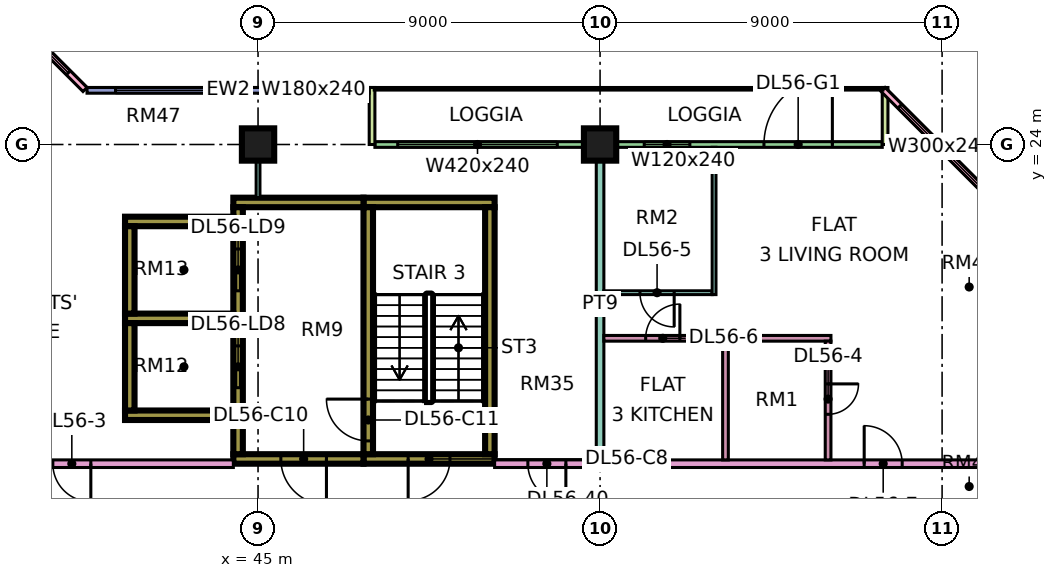
"""IFC4 building model, lengths in metres.
Left out: names, types, materials, properties, quantities, classifications, styles, units other than length and angle.
Written with IfcOpenShell. Run it as: python <this file> out.ifc"""

import sys

from ifc_helpers import new_model, si_unit, direction, frame, frame_2d, origin, origin_2d, place, context, subcontext, project, spatial, rectangle, extrude, element, fill, save


model = new_model("IFC4")
c1 = context("Model", 3, precision=1e-05, world=origin(), true_north=direction((0.0, 1.0)))
c2 = subcontext(c1, "Body", "Model", "MODEL_VIEW")
j1 = project(units=[si_unit("LENGTHUNIT", "METRE"), si_unit("PLANEANGLEUNIT", "RADIAN")], contexts=[c1])
p1 = place(None, origin())
s1 = spatial("IfcSite", under=j1, at=p1, CompositionType="ELEMENT")
p2 = place(p1, origin())
s2 = spatial("IfcBuilding", under=s1, at=p2, CompositionType="ELEMENT")
p3 = place(p2, frame((0.0, 0.0, 237.9)))
s3 = spatial("IfcBuildingStorey", under=s2, at=p3, CompositionType="ELEMENT", Elevation=237.9)
for number, where, z_axis, x_axis in (
    (1, (45.0, 24.0, 0.0), (0.0, 0.0, 1.0), (1.0, 0.0, 0.0)),
    (2, (54.0, 24.0, 0.0), (0.0, 0.0, 1.0), (1.0, 0.0, 0.0)),
):
    element("IfcColumn", number, at=place(p3, frame(where, z_axis=z_axis, x_axis=x_axis)), inside=s3, PredefinedType="COLUMN", context=c2, shape_type="SweptSolid", body=[
        extrude(rectangle(XDim=0.85, YDim=0.85, at=origin_2d()), origin(), (0.0, 0.0, 1.0), 3.75),
    ])
p4 = place(p3, frame((47.775, 15.725, 0.0), z_axis=(0.0, 0.0, 1.0), x_axis=(1.0, 0.0, 0.0)))
e3 = element("IfcWall", 3, at=p4, inside=s3, PredefinedType="SHEAR", context=c2, shape_type="SweptSolid", body=[
    extrude(rectangle(XDim=3.45, YDim=0.25, at=frame_2d((1.725, 0.0))), origin(), (0.0, 0.0, 1.0), 3.75),
])
p5 = place(p4, frame((1.175, 0.0, 0.0)))
e4 = element("IfcOpeningElement", 4, at=p5, cuts=e3, PredefinedType="OPENING", context=c2, shape_type="SweptSolid", body=[
    extrude(rectangle(XDim=1.1, YDim=2.2, at=frame_2d((0.55, 1.1))), frame((0.0, 0.135, 0.0), z_axis=(0.0, -1.0, 0.0), x_axis=(1.0, 0.0, 0.0)), (0.0, 0.0, 1.0), 0.27),
])
p6 = place(p3, frame((47.775, 22.475, 0.0), z_axis=(0.0, 0.0, 1.0), x_axis=(1.0, 0.0, 0.0)))
e5 = element("IfcWall", 5, at=p6, inside=s3, PredefinedType="SHEAR", context=c2, shape_type="SweptSolid", body=[
    extrude(rectangle(XDim=3.45, YDim=0.25, at=frame_2d((1.725, 0.0))), origin(), (0.0, 0.0, 1.0), 3.75),
])
p7 = place(p3, frame((47.9, 15.85, 0.0), z_axis=(0.0, 0.0, 1.0), x_axis=(0.0, 1.0, 0.0)))
e6 = element("IfcWall", 6, at=p7, inside=s3, PredefinedType="SHEAR", context=c2, shape_type="SweptSolid", body=[
    extrude(rectangle(XDim=6.5, YDim=0.25, at=frame_2d((3.25, 0.0))), origin(), (0.0, 0.0, 1.0), 3.75),
])
p8 = place(p7, frame((0.35, 0.0, 0.0)))
e7 = element("IfcOpeningElement", 7, at=p8, cuts=e6, PredefinedType="OPENING", context=c2, shape_type="SweptSolid", body=[
    extrude(rectangle(XDim=1.1, YDim=2.2, at=frame_2d((0.55, 1.1))), frame((0.0, 0.135, 0.0), z_axis=(0.0, -1.0, 0.0), x_axis=(1.0, 0.0, 0.0)), (0.0, 0.0, 1.0), 0.27),
])
p9 = place(p3, frame((51.1, 15.85, 0.0), z_axis=(0.0, 0.0, 1.0), x_axis=(0.0, 1.0, 0.0)))
e8 = element("IfcWall", 8, at=p9, inside=s3, PredefinedType="SHEAR", context=c2, shape_type="SweptSolid", body=[
    extrude(rectangle(XDim=6.5, YDim=0.25, at=frame_2d((3.25, 0.0))), origin(), (0.0, 0.0, 1.0), 3.75),
])
p10 = place(p3, frame((44.35, 15.725, 0.0), z_axis=(0.0, 0.0, 1.0), x_axis=(1.0, 0.0, 0.0)))
e9 = element("IfcWall", 9, at=p10, inside=s3, PredefinedType="SHEAR", context=c2, shape_type="SweptSolid", body=[
    extrude(rectangle(XDim=3.425, YDim=0.25, at=frame_2d((1.712, 0.0))), origin(), (0.0, 0.0, 1.0), 3.75),
])
p11 = place(p10, frame((1.25, 0.0, 0.0)))
e10 = element("IfcOpeningElement", 10, at=p11, cuts=e9, PredefinedType="OPENING", context=c2, shape_type="SweptSolid", body=[
    extrude(rectangle(XDim=1.2, YDim=2.2, at=frame_2d((0.6, 1.1))), frame((0.0, 0.135, 0.0), z_axis=(0.0, -1.0, 0.0), x_axis=(1.0, 0.0, 0.0)), (0.0, 0.0, 1.0), 0.27),
])
p12 = place(p3, frame((44.35, 22.475, 0.0), z_axis=(0.0, 0.0, 1.0), x_axis=(1.0, 0.0, 0.0)))
e11 = element("IfcWall", 11, at=p12, inside=s3, PredefinedType="SHEAR", context=c2, shape_type="SweptSolid", body=[
    extrude(rectangle(XDim=3.425, YDim=0.25, at=frame_2d((1.712, 0.0))), origin(), (0.0, 0.0, 1.0), 3.75),
])
p13 = place(p3, frame((44.475, 15.85, 0.0), z_axis=(0.0, 0.0, 1.0), x_axis=(0.0, 1.0, 0.0)))
e12 = element("IfcWall", 12, at=p13, inside=s3, PredefinedType="SHEAR", context=c2, shape_type="SweptSolid", body=[
    extrude(rectangle(XDim=6.5, YDim=0.25, at=frame_2d((3.25, 0.0))), origin(), (0.0, 0.0, 1.0), 3.75),
])
p14 = place(p13, frame((1.75, 0.0, 0.0)))
e13 = element("IfcOpeningElement", 13, at=p14, cuts=e12, PredefinedType="OPENING", context=c2, shape_type="SweptSolid", body=[
    extrude(rectangle(XDim=1.1, YDim=2.2, at=frame_2d((0.55, 1.1))), frame((0.0, 0.135, 0.0), z_axis=(0.0, -1.0, 0.0), x_axis=(1.0, 0.0, 0.0)), (0.0, 0.0, 1.0), 0.27),
])
p15 = place(p13, frame((4.3, 0.0, 0.0)))
e14 = element("IfcOpeningElement", 14, at=p15, cuts=e12, PredefinedType="OPENING", context=c2, shape_type="SweptSolid", body=[
    extrude(rectangle(XDim=1.1, YDim=2.2, at=frame_2d((0.55, 1.1))), frame((0.0, 0.135, 0.0), z_axis=(0.0, -1.0, 0.0), x_axis=(1.0, 0.0, 0.0)), (0.0, 0.0, 1.0), 0.27),
])
for number, where, z_axis, x_axis in (
    (15, (41.5, 16.875, 0.0), (0.0, 0.0, 1.0), (1.0, 0.0, 0.0)),
    (16, (41.5, 19.425, 0.0), (0.0, 0.0, 1.0), (1.0, 0.0, 0.0)),
    (17, (41.5, 21.975, 0.0), (0.0, 0.0, 1.0), (1.0, 0.0, 0.0)),
):
    element("IfcWall", number, at=place(p3, frame(where, z_axis=z_axis, x_axis=x_axis)), inside=s3, PredefinedType="SHEAR", context=c2, shape_type="SweptSolid", body=[
        extrude(rectangle(XDim=2.85, YDim=0.25, at=frame_2d((1.425, 0.0))), origin(), (0.0, 0.0, 1.0), 3.75),
    ])
for number, where, z_axis, x_axis in (
    (18, (41.625, 17.0, 0.0), (0.0, 0.0, 1.0), (0.0, 1.0, 0.0)),
    (19, (41.625, 19.55, 0.0), (0.0, 0.0, 1.0), (0.0, 1.0, 0.0)),
):
    element("IfcWall", number, at=place(p3, frame(where, z_axis=z_axis, x_axis=x_axis)), inside=s3, PredefinedType="SHEAR", context=c2, shape_type="SweptSolid", body=[
        extrude(rectangle(XDim=2.3, YDim=0.25, at=frame_2d((1.15, 0.0))), origin(), (0.0, 0.0, 1.0), 3.75),
    ])
p16 = place(p3, frame((61.425, 24.0, 0.0), z_axis=(0.0, 0.0, 1.0), x_axis=(-1.0, 0.0, 0.0)))
e20 = element("IfcWall", 20, at=p16, inside=s3, PredefinedType="SOLIDWALL", context=c2, shape_type="SweptSolid", body=[
    extrude(rectangle(XDim=13.35, YDim=0.15, at=frame_2d((6.675, 0.0))), origin(), (0.0, 0.0, 1.0), 3.35),
])
p17 = place(p16, frame((1.312, 0.0, 0.0)))
e21 = element("IfcOpeningElement", 21, at=p17, cuts=e20, PredefinedType="OPENING", context=c2, shape_type="SweptSolid", body=[
    extrude(rectangle(XDim=1.8, YDim=2.4, at=frame_2d((0.9, 1.2))), frame((0.0, 0.085, 0.0), z_axis=(0.0, -1.0, 0.0), x_axis=(1.0, 0.0, 0.0)), (0.0, 0.0, 1.0), 0.17),
])
p18 = place(p16, frame((5.062, 0.0, 0.45)))
e22 = element("IfcOpeningElement", 22, at=p18, cuts=e20, PredefinedType="OPENING", context=c2, shape_type="SweptSolid", body=[
    extrude(rectangle(XDim=1.2, YDim=2.4, at=frame_2d((0.6, 1.2))), frame((0.0, 0.085, 0.0), z_axis=(0.0, -1.0, 0.0), x_axis=(1.0, 0.0, 0.0)), (0.0, 0.0, 1.0), 0.17),
])
p19 = place(p16, frame((8.55, 0.0, 0.45)))
e23 = element("IfcOpeningElement", 23, at=p19, cuts=e20, PredefinedType="OPENING", context=c2, shape_type="SweptSolid", body=[
    extrude(rectangle(XDim=4.2, YDim=2.4, at=frame_2d((2.1, 1.2))), frame((0.0, 0.085, 0.0), z_axis=(0.0, -1.0, 0.0), x_axis=(1.0, 0.0, 0.0)), (0.0, 0.0, 1.0), 0.17),
])
for number, where, z_axis, x_axis in (
    (24, (61.5, 25.5, 0.0), (0.0, 0.0, 1.0), (0.0, -1.0, 0.0)),
    (25, (48.0, 25.5, 0.0), (0.0, 0.0, 1.0), (0.0, -1.0, 0.0)),
):
    element("IfcWall", number, at=place(p3, frame(where, z_axis=z_axis, x_axis=x_axis)), inside=s3, PredefinedType="SOLIDWALL", context=c2, shape_type="SweptSolid", body=[
        extrude(rectangle(XDim=1.5, YDim=0.15, at=frame_2d((0.75, 0.0))), origin(), (0.0, 0.0, 1.0), 3.35),
    ])
p20 = place(p3, frame((47.925, 25.425, 0.0), z_axis=(0.0, 0.0, 1.0), x_axis=(-1.0, 0.0, 0.0)))
e26 = element("IfcWall", 26, at=p20, inside=s3, PredefinedType="SOLIDWALL", context=c2, shape_type="SweptSolid", body=[
    extrude(rectangle(XDim=7.425, YDim=0.15, at=frame_2d((3.712, 0.0))), origin(), (0.0, 0.0, 1.0), 3.35),
])
p21 = place(p20, frame((0.562, 0.0, 0.45)))
e27 = element("IfcOpeningElement", 27, at=p21, cuts=e26, PredefinedType="OPENING", context=c2, shape_type="SweptSolid", body=[
    extrude(rectangle(XDim=1.8, YDim=2.4, at=frame_2d((0.9, 1.2))), frame((0.0, 0.085, 0.0), z_axis=(0.0, -1.0, 0.0), x_axis=(1.0, 0.0, 0.0)), (0.0, 0.0, 1.0), 0.17),
])
p22 = place(p20, frame((3.675, 0.0, 0.45)))
e28 = element("IfcOpeningElement", 28, at=p22, cuts=e26, PredefinedType="OPENING", context=c2, shape_type="SweptSolid", body=[
    extrude(rectangle(XDim=3.0, YDim=2.4, at=frame_2d((1.5, 1.2))), frame((0.0, 0.085, 0.0), z_axis=(0.0, -1.0, 0.0), x_axis=(1.0, 0.0, 0.0)), (0.0, 0.0, 1.0), 0.17),
])
p23 = place(p3, frame((40.447, 25.447, 0.0), z_axis=(0.0, 0.0, 1.0), x_axis=(-0.707106781187, 0.707106781187, 0.0)))
e29 = element("IfcWall", 29, at=p23, inside=s3, PredefinedType="SOLIDWALL", context=c2, shape_type="SweptSolid", body=[
    extrude(rectangle(XDim=4.243, YDim=0.15, at=frame_2d((2.121, 0.0))), origin(), (0.0, 0.0, 1.0), 3.35),
])
p24 = place(p23, frame((0.621, 0.0, 0.45)))
e30 = element("IfcOpeningElement", 30, at=p24, cuts=e29, PredefinedType="OPENING", context=c2, shape_type="SweptSolid", body=[
    extrude(rectangle(XDim=3.0, YDim=2.4, at=frame_2d((1.5, 1.2))), frame((0.0, 0.085, 0.0), z_axis=(0.0, -1.0, 0.0), x_axis=(1.0, 0.0, 0.0)), (0.0, 0.0, 1.0), 0.17),
])
p25 = place(p3, frame((64.447, 22.447, 0.0), z_axis=(0.0, 0.0, 1.0), x_axis=(-0.707106781187, 0.707106781187, 0.0)))
e31 = element("IfcWall", 31, at=p25, inside=s3, PredefinedType="SOLIDWALL", context=c2, shape_type="SweptSolid", body=[
    extrude(rectangle(XDim=4.243, YDim=0.15, at=frame_2d((2.121, 0.0))), origin(), (0.0, 0.0, 1.0), 3.35),
])
p26 = place(p25, frame((0.621, 0.0, 0.45)))
e32 = element("IfcOpeningElement", 32, at=p26, cuts=e31, PredefinedType="OPENING", context=c2, shape_type="SweptSolid", body=[
    extrude(rectangle(XDim=3.0, YDim=2.4, at=frame_2d((1.5, 1.2))), frame((0.0, 0.085, 0.0), z_axis=(0.0, -1.0, 0.0), x_axis=(1.0, 0.0, 0.0)), (0.0, 0.0, 1.0), 0.17),
])
p27 = place(p3, frame((34.0, 15.6, 0.0), z_axis=(0.0, 0.0, 1.0), x_axis=(1.0, 0.0, 0.0)))
e33 = element("IfcWall", 33, at=p27, inside=s3, PredefinedType="PARTITIONING", context=c2, shape_type="SweptSolid", body=[
    extrude(rectangle(XDim=10.35, YDim=0.2, at=frame_2d((5.175, 0.0))), origin(), (0.0, 0.0, 1.0), 3.35),
])
p28 = place(p27, frame((5.6, 0.0, 0.0)))
e34 = element("IfcOpeningElement", 34, at=p28, cuts=e33, PredefinedType="OPENING", context=c2, shape_type="SweptSolid", body=[
    extrude(rectangle(XDim=1.0, YDim=2.1, at=frame_2d((0.5, 1.05))), frame((0.0, 0.11, 0.0), z_axis=(0.0, -1.0, 0.0), x_axis=(1.0, 0.0, 0.0)), (0.0, 0.0, 1.0), 0.22),
])
p29 = place(p27, frame((0.45, 0.0, 0.0)))
e35 = element("IfcOpeningElement", 35, at=p29, cuts=e33, PredefinedType="OPENING", context=c2, shape_type="SweptSolid", body=[
    extrude(rectangle(XDim=1.2, YDim=2.1, at=frame_2d((0.6, 1.05))), frame((0.0, 0.11, 0.0), z_axis=(0.0, -1.0, 0.0), x_axis=(1.0, 0.0, 0.0)), (0.0, 0.0, 1.0), 0.22),
])
p30 = place(p3, frame((45.0, 22.6, 0.0), z_axis=(0.0, 0.0, 1.0), x_axis=(0.0, 1.0, 0.0)))
e36 = element("IfcWall", 36, at=p30, inside=s3, PredefinedType="PARTITIONING", context=c2, shape_type="SweptSolid", body=[
    extrude(rectangle(XDim=1.4, YDim=0.1, at=frame_2d((0.7, 0.0))), origin(), (0.0, 0.0, 1.0), 3.35),
])
p31 = place(p3, frame((51.225, 15.6, 0.0), z_axis=(0.0, 0.0, 1.0), x_axis=(1.0, 0.0, 0.0)))
e37 = element("IfcWall", 37, at=p31, inside=s3, PredefinedType="PARTITIONING", context=c2, shape_type="SweptSolid", body=[
    extrude(rectangle(XDim=13.125, YDim=0.2, at=frame_2d((6.562, 0.0))), origin(), (0.0, 0.0, 1.0), 3.35),
])
p32 = place(p31, frame((9.725, 0.0, 0.0)))
e38 = element("IfcOpeningElement", 38, at=p32, cuts=e37, PredefinedType="OPENING", context=c2, shape_type="SweptSolid", body=[
    extrude(rectangle(XDim=1.0, YDim=2.1, at=frame_2d((0.5, 1.05))), frame((0.0, 0.11, 0.0), z_axis=(0.0, -1.0, 0.0), x_axis=(1.0, 0.0, 0.0)), (0.0, 0.0, 1.0), 0.22),
])
p33 = place(p31, frame((0.875, 0.0, 0.0)))
e39 = element("IfcOpeningElement", 39, at=p33, cuts=e37, PredefinedType="OPENING", context=c2, shape_type="SweptSolid", body=[
    extrude(rectangle(XDim=1.0, YDim=2.1, at=frame_2d((0.5, 1.05))), frame((0.0, 0.11, 0.0), z_axis=(0.0, -1.0, 0.0), x_axis=(1.0, 0.0, 0.0)), (0.0, 0.0, 1.0), 0.22),
])
p34 = place(p3, frame((54.0, 15.7, 0.0), z_axis=(0.0, 0.0, 1.0), x_axis=(0.0, 1.0, 0.0)))
e40 = element("IfcWall", 40, at=p34, inside=s3, PredefinedType="PARTITIONING", context=c2, shape_type="SweptSolid", body=[
    extrude(rectangle(XDim=8.226, YDim=0.2, at=frame_2d((4.113, 0.0))), origin(), (0.0, 0.0, 1.0), 3.35),
])
p35 = place(p3, frame((54.1, 18.9, 0.0), z_axis=(0.0, 0.0, 1.0), x_axis=(1.0, 0.0, 0.0)))
e41 = element("IfcWall", 41, at=p35, inside=s3, PredefinedType="PARTITIONING", context=c2, shape_type="SweptSolid", body=[
    extrude(rectangle(XDim=5.975, YDim=0.15, at=frame_2d((2.987, 0.0))), origin(), (0.0, 0.0, 1.0), 3.35),
])
p36 = place(p35, frame((1.1, 0.0, 0.0)))
e42 = element("IfcOpeningElement", 42, at=p36, cuts=e41, PredefinedType="OPENING", context=c2, shape_type="SweptSolid", body=[
    extrude(rectangle(XDim=0.9, YDim=2.1, at=frame_2d((0.45, 1.05))), frame((0.0, 0.085, 0.0), z_axis=(0.0, -1.0, 0.0), x_axis=(1.0, 0.0, 0.0)), (0.0, 0.0, 1.0), 0.17),
])
p37 = place(p3, frame((54.1, 20.1, 0.0), z_axis=(0.0, 0.0, 1.0), x_axis=(1.0, 0.0, 0.0)))
e43 = element("IfcWall", 43, at=p37, inside=s3, PredefinedType="PARTITIONING", context=c2, shape_type="SweptSolid", body=[
    extrude(rectangle(XDim=2.85, YDim=0.1, at=frame_2d((1.425, 0.0))), origin(), (0.0, 0.0, 1.0), 3.35),
])
p38 = place(p37, frame((0.95, 0.0, 0.0)))
e44 = element("IfcOpeningElement", 44, at=p38, cuts=e43, PredefinedType="OPENING", context=c2, shape_type="SweptSolid", body=[
    extrude(rectangle(XDim=0.9, YDim=2.1, at=frame_2d((0.45, 1.05))), frame((0.0, 0.06, 0.0), z_axis=(0.0, -1.0, 0.0), x_axis=(1.0, 0.0, 0.0)), (0.0, 0.0, 1.0), 0.12),
])
p39 = place(p3, frame((57.0, 20.05, 0.0), z_axis=(0.0, 0.0, 1.0), x_axis=(0.0, 1.0, 0.0)))
e45 = element("IfcWall", 45, at=p39, inside=s3, PredefinedType="PARTITIONING", context=c2, shape_type="SweptSolid", body=[
    extrude(rectangle(XDim=3.876, YDim=0.1, at=frame_2d((1.938, 0.0))), origin(), (0.0, 0.0, 1.0), 3.35),
])
p40 = place(p3, frame((57.3, 15.7, 0.0), z_axis=(0.0, 0.0, 1.0), x_axis=(0.0, 1.0, 0.0)))
e46 = element("IfcWall", 46, at=p40, inside=s3, PredefinedType="PARTITIONING", context=c2, shape_type="SweptSolid", body=[
    extrude(rectangle(XDim=3.125, YDim=0.15, at=frame_2d((1.562, 0.0))), origin(), (0.0, 0.0, 1.0), 3.35),
])
p41 = place(p3, frame((60.0, 15.7, 0.0), z_axis=(0.0, 0.0, 1.0), x_axis=(0.0, 1.0, 0.0)))
e47 = element("IfcWall", 47, at=p41, inside=s3, PredefinedType="PARTITIONING", context=c2, shape_type="SweptSolid", body=[
    extrude(rectangle(XDim=3.125, YDim=0.15, at=frame_2d((1.562, 0.0))), origin(), (0.0, 0.0, 1.0), 3.35),
])
p42 = place(p41, frame((1.2, 0.0, 0.0)))
e48 = element("IfcOpeningElement", 48, at=p42, cuts=e47, PredefinedType="OPENING", context=c2, shape_type="SweptSolid", body=[
    extrude(rectangle(XDim=0.8, YDim=2.1, at=frame_2d((0.4, 1.05))), frame((0.0, 0.085, 0.0), z_axis=(0.0, -1.0, 0.0), x_axis=(1.0, 0.0, 0.0)), (0.0, 0.0, 1.0), 0.17),
])
p43 = place(p17, frame((1.8, 0.0, 0.0), z_axis=(0.0, 0.0, 1.0), x_axis=(-1.0, 0.0, 0.0)))
e49 = element("IfcDoor", 49, at=p43, inside=s3, OperationType="DOUBLE_DOOR_SINGLE_SWING", PredefinedType="DOOR", context=c2, shape_type="SweptSolid", body=[
    extrude(rectangle(XDim=1.8, YDim=2.4, at=frame_2d((0.9, 1.2))), frame((0.0, 0.025, 0.0), z_axis=(0.0, -1.0, 0.0), x_axis=(1.0, 0.0, 0.0)), (0.0, 0.0, 1.0), 0.05),
])
fill(e21, e49)
p44 = place(p18, origin())
e50 = element("IfcWindow", 50, at=p44, inside=s3, PartitioningType="SINGLE_PANEL", PredefinedType="WINDOW", context=c2, shape_type="SweptSolid", body=[
    extrude(rectangle(XDim=1.2, YDim=2.4, at=frame_2d((0.6, 1.2))), frame((0.0, 0.03, 0.0), z_axis=(0.0, -1.0, 0.0), x_axis=(1.0, 0.0, 0.0)), (0.0, 0.0, 1.0), 0.06),
])
fill(e22, e50)
p45 = place(p19, origin())
e51 = element("IfcWindow", 51, at=p45, inside=s3, PartitioningType="SINGLE_PANEL", PredefinedType="WINDOW", context=c2, shape_type="SweptSolid", body=[
    extrude(rectangle(XDim=4.2, YDim=2.4, at=frame_2d((2.1, 1.2))), frame((0.0, 0.03, 0.0), z_axis=(0.0, -1.0, 0.0), x_axis=(1.0, 0.0, 0.0)), (0.0, 0.0, 1.0), 0.06),
])
fill(e23, e51)
p46 = place(p21, origin())
e52 = element("IfcWindow", 52, at=p46, inside=s3, PartitioningType="SINGLE_PANEL", PredefinedType="WINDOW", context=c2, shape_type="SweptSolid", body=[
    extrude(rectangle(XDim=1.8, YDim=2.4, at=frame_2d((0.9, 1.2))), frame((0.0, 0.03, 0.0), z_axis=(0.0, -1.0, 0.0), x_axis=(1.0, 0.0, 0.0)), (0.0, 0.0, 1.0), 0.06),
])
fill(e27, e52)
p47 = place(p22, origin())
e53 = element("IfcWindow", 53, at=p47, inside=s3, PartitioningType="SINGLE_PANEL", PredefinedType="WINDOW", context=c2, shape_type="SweptSolid", body=[
    extrude(rectangle(XDim=3.0, YDim=2.4, at=frame_2d((1.5, 1.2))), frame((0.0, 0.03, 0.0), z_axis=(0.0, -1.0, 0.0), x_axis=(1.0, 0.0, 0.0)), (0.0, 0.0, 1.0), 0.06),
])
fill(e28, e53)
p48 = place(p24, origin())
e54 = element("IfcWindow", 54, at=p48, inside=s3, PartitioningType="SINGLE_PANEL", PredefinedType="WINDOW", context=c2, shape_type="SweptSolid", body=[
    extrude(rectangle(XDim=3.0, YDim=2.4, at=frame_2d((1.5, 1.2))), frame((0.0, 0.03, 0.0), z_axis=(0.0, -1.0, 0.0), x_axis=(1.0, 0.0, 0.0)), (0.0, 0.0, 1.0), 0.06),
])
fill(e30, e54)
p49 = place(p26, origin())
e55 = element("IfcWindow", 55, at=p49, inside=s3, PartitioningType="SINGLE_PANEL", PredefinedType="WINDOW", context=c2, shape_type="SweptSolid", body=[
    extrude(rectangle(XDim=3.0, YDim=2.4, at=frame_2d((1.5, 1.2))), frame((0.0, 0.03, 0.0), z_axis=(0.0, -1.0, 0.0), x_axis=(1.0, 0.0, 0.0)), (0.0, 0.0, 1.0), 0.06),
])
fill(e32, e55)
p50 = place(p5, frame((1.1, 0.0, 0.0), z_axis=(0.0, 0.0, 1.0), x_axis=(-1.0, 0.0, 0.0)))
e56 = element("IfcDoor", 56, at=p50, inside=s3, OperationType="SINGLE_SWING_LEFT", PredefinedType="DOOR", context=c2, shape_type="SweptSolid", body=[
    extrude(rectangle(XDim=1.1, YDim=2.2, at=frame_2d((0.55, 1.1))), frame((0.0, 0.025, 0.0), z_axis=(0.0, -1.0, 0.0), x_axis=(1.0, 0.0, 0.0)), (0.0, 0.0, 1.0), 0.05),
])
fill(e4, e56)
p51 = place(p11, origin())
e57 = element("IfcDoor", 57, at=p51, inside=s3, OperationType="SINGLE_SWING_RIGHT", PredefinedType="DOOR", context=c2, shape_type="SweptSolid", body=[
    extrude(rectangle(XDim=1.2, YDim=2.2, at=frame_2d((0.6, 1.1))), frame((0.0, 0.025, 0.0), z_axis=(0.0, -1.0, 0.0), x_axis=(1.0, 0.0, 0.0)), (0.0, 0.0, 1.0), 0.05),
])
fill(e10, e57)
p52 = place(p8, frame((1.1, 0.0, 0.0), z_axis=(0.0, 0.0, 1.0), x_axis=(-1.0, 0.0, 0.0)))
e58 = element("IfcDoor", 58, at=p52, inside=s3, OperationType="SINGLE_SWING_RIGHT", PredefinedType="DOOR", context=c2, shape_type="SweptSolid", body=[
    extrude(rectangle(XDim=1.1, YDim=2.2, at=frame_2d((0.55, 1.1))), frame((0.0, 0.025, 0.0), z_axis=(0.0, -1.0, 0.0), x_axis=(1.0, 0.0, 0.0)), (0.0, 0.0, 1.0), 0.05),
])
fill(e7, e58)
p53 = place(p14, origin())
e59 = element("IfcDoor", 59, at=p53, inside=s3, OperationType="DOUBLE_DOOR_SLIDING", PredefinedType="DOOR", context=c2, shape_type="SweptSolid", body=[
    extrude(rectangle(XDim=1.1, YDim=2.2, at=frame_2d((0.55, 1.1))), frame((0.0, 0.025, 0.0), z_axis=(0.0, -1.0, 0.0), x_axis=(1.0, 0.0, 0.0)), (0.0, 0.0, 1.0), 0.05),
])
fill(e13, e59)
p54 = place(p15, origin())
e60 = element("IfcDoor", 60, at=p54, inside=s3, OperationType="DOUBLE_DOOR_SLIDING", PredefinedType="DOOR", context=c2, shape_type="SweptSolid", body=[
    extrude(rectangle(XDim=1.1, YDim=2.2, at=frame_2d((0.55, 1.1))), frame((0.0, 0.025, 0.0), z_axis=(0.0, -1.0, 0.0), x_axis=(1.0, 0.0, 0.0)), (0.0, 0.0, 1.0), 0.05),
])
fill(e14, e60)
p55 = place(p28, origin())
e61 = element("IfcDoor", 61, at=p55, inside=s3, OperationType="SINGLE_SWING_RIGHT", PredefinedType="DOOR", context=c2, shape_type="SweptSolid", body=[
    extrude(rectangle(XDim=1.0, YDim=2.1, at=frame_2d((0.5, 1.05))), frame((0.0, 0.025, 0.0), z_axis=(0.0, -1.0, 0.0), x_axis=(1.0, 0.0, 0.0)), (0.0, 0.0, 1.0), 0.05),
])
fill(e34, e61)
p56 = place(p42, origin())
e62 = element("IfcDoor", 62, at=p56, inside=s3, OperationType="SINGLE_SWING_RIGHT", PredefinedType="DOOR", context=c2, shape_type="SweptSolid", body=[
    extrude(rectangle(XDim=0.8, YDim=2.1, at=frame_2d((0.4, 1.05))), frame((0.0, 0.025, 0.0), z_axis=(0.0, -1.0, 0.0), x_axis=(1.0, 0.0, 0.0)), (0.0, 0.0, 1.0), 0.05),
])
fill(e48, e62)
p57 = place(p38, origin())
e63 = element("IfcDoor", 63, at=p57, inside=s3, OperationType="SINGLE_SWING_RIGHT", PredefinedType="DOOR", context=c2, shape_type="SweptSolid", body=[
    extrude(rectangle(XDim=0.9, YDim=2.1, at=frame_2d((0.45, 1.05))), frame((0.0, 0.025, 0.0), z_axis=(0.0, -1.0, 0.0), x_axis=(1.0, 0.0, 0.0)), (0.0, 0.0, 1.0), 0.05),
])
fill(e44, e63)
p58 = place(p36, frame((0.9, 0.0, 0.0), z_axis=(0.0, 0.0, 1.0), x_axis=(-1.0, 0.0, 0.0)))
e64 = element("IfcDoor", 64, at=p58, inside=s3, OperationType="SINGLE_SWING_RIGHT", PredefinedType="DOOR", context=c2, shape_type="SweptSolid", body=[
    extrude(rectangle(XDim=0.9, YDim=2.1, at=frame_2d((0.45, 1.05))), frame((0.0, 0.025, 0.0), z_axis=(0.0, -1.0, 0.0), x_axis=(1.0, 0.0, 0.0)), (0.0, 0.0, 1.0), 0.05),
])
fill(e42, e64)
p59 = place(p32, origin())
e65 = element("IfcDoor", 65, at=p59, inside=s3, OperationType="SINGLE_SWING_LEFT", PredefinedType="DOOR", context=c2, shape_type="SweptSolid", body=[
    extrude(rectangle(XDim=1.0, YDim=2.1, at=frame_2d((0.5, 1.05))), frame((0.0, 0.025, 0.0), z_axis=(0.0, -1.0, 0.0), x_axis=(1.0, 0.0, 0.0)), (0.0, 0.0, 1.0), 0.05),
])
fill(e38, e65)
p60 = place(p33, origin())
e66 = element("IfcDoor", 66, at=p60, inside=s3, OperationType="SINGLE_SWING_RIGHT", PredefinedType="DOOR", context=c2, shape_type="SweptSolid", body=[
    extrude(rectangle(XDim=1.0, YDim=2.1, at=frame_2d((0.5, 1.05))), frame((0.0, 0.025, 0.0), z_axis=(0.0, -1.0, 0.0), x_axis=(1.0, 0.0, 0.0)), (0.0, 0.0, 1.0), 0.05),
])
fill(e39, e66)
save(model, sys.argv[1])
